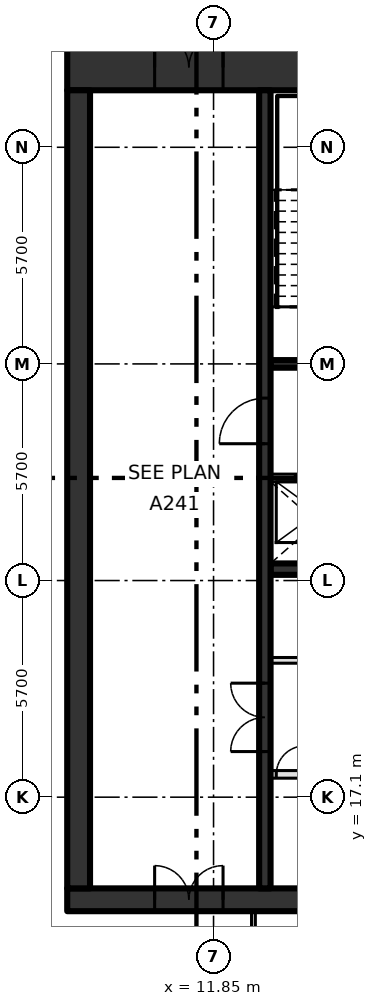
"""IFC4 building model, lengths in metres.
Left out: names, types, materials, properties, quantities, classifications, styles, units other than length and angle.
Written with IfcOpenShell. Run it as: python <this file> out.ifc"""

import sys

from ifc_helpers import new_model, si_unit, direction, frame, frame_2d, origin, place, context, subcontext, project, spatial, rectangle, extrude, element, fill, save


model = new_model("IFC4")
c1 = context("Model", 3, precision=1e-05, world=origin(), true_north=direction((0.0, 1.0)))
c2 = subcontext(c1, "Body", "Model", "MODEL_VIEW")
j1 = project(units=[si_unit("LENGTHUNIT", "METRE"), si_unit("PLANEANGLEUNIT", "RADIAN")], contexts=[c1])
p1 = place(None, origin())
s1 = spatial("IfcSite", under=j1, at=p1, CompositionType="ELEMENT")
p2 = place(p1, origin())
s2 = spatial("IfcBuilding", under=s1, at=p2, CompositionType="ELEMENT")
p3 = place(p2, frame((0.0, 0.0, 310.8)))
s3 = spatial("IfcBuildingStorey", under=s2, at=p3, CompositionType="ELEMENT", Elevation=310.8)
p4 = place(p3, frame((8.0, 14.4, -0.3), z_axis=(0.0, 0.0, 1.0), x_axis=(1.0, 0.0, 0.0)))
e1 = element("IfcWall", 1, at=p4, inside=s3, PredefinedType="SHEAR", context=c2, shape_type="SweptSolid", body=[
    extrude(rectangle(XDim=22.8, YDim=0.6, at=frame_2d((11.4, 0.0))), origin(), (0.0, 0.0, 1.0), 4.2),
])
p5 = place(p4, frame((2.3, 0.0, 0.3)))
e2 = element("IfcOpeningElement", 2, at=p5, cuts=e1, PredefinedType="OPENING", context=c2, shape_type="SweptSolid", body=[
    extrude(rectangle(XDim=1.8, YDim=2.1, at=frame_2d((0.9, 1.05))), frame((0.0, 0.31, 0.0), z_axis=(0.0, -1.0, 0.0), x_axis=(1.0, 0.0, 0.0)), (0.0, 0.0, 1.0), 0.62),
])
p6 = place(p3, frame((8.0, 36.3, -0.3), z_axis=(0.0, 0.0, 1.0), x_axis=(1.0, 0.0, 0.0)))
e3 = element("IfcWall", 3, at=p6, inside=s3, PredefinedType="SHEAR", context=c2, shape_type="SweptSolid", body=[
    extrude(rectangle(XDim=22.8, YDim=1.2, at=frame_2d((11.4, 0.0))), origin(), (0.0, 0.0, 1.0), 4.2),
])
p7 = place(p6, frame((2.3, 0.0, 0.3)))
e4 = element("IfcOpeningElement", 4, at=p7, cuts=e3, PredefinedType="OPENING", context=c2, shape_type="SweptSolid", body=[
    extrude(rectangle(XDim=1.8, YDim=2.1, at=frame_2d((0.9, 1.05))), frame((0.0, 0.61, 0.0), z_axis=(0.0, -1.0, 0.0), x_axis=(1.0, 0.0, 0.0)), (0.0, 0.0, 1.0), 1.22),
])
p8 = place(p3, frame((8.3, 14.7, -0.3), z_axis=(0.0, 0.0, 1.0), x_axis=(0.0, 1.0, 0.0)))
e5 = element("IfcWall", 5, at=p8, inside=s3, PredefinedType="SHEAR", context=c2, shape_type="SweptSolid", body=[
    extrude(rectangle(XDim=21.0, YDim=0.6, at=frame_2d((10.5, 0.0))), origin(), (0.0, 0.0, 1.0), 4.2),
])
p9 = place(p3, frame((13.35, 17.7, 0.0), z_axis=(0.0, 0.0, 1.0), x_axis=(1.0, 0.0, 0.0)))
e6 = element("IfcWall", 6, at=p9, inside=s3, PredefinedType="SOLIDWALL", context=c2, shape_type="SweptSolid", body=[
    extrude(rectangle(XDim=13.425, YDim=0.2, at=frame_2d((6.712, 0.0))), origin(), (0.0, 0.0, 1.0), 3.9),
])
p10 = place(p9, frame((2.0, 0.0, 0.0)))
e7 = element("IfcOpeningElement", 7, at=p10, cuts=e6, PredefinedType="OPENING", context=c2, shape_type="SweptSolid", body=[
    extrude(rectangle(XDim=1.1, YDim=2.1, at=frame_2d((0.55, 1.05))), frame((0.0, 0.11, 0.0), z_axis=(0.0, -1.0, 0.0), x_axis=(1.0, 0.0, 0.0)), (0.0, 0.0, 1.0), 0.22),
])
p11 = place(p9, frame((4.7, 0.0, 0.0)))
e8 = element("IfcOpeningElement", 8, at=p11, cuts=e6, PredefinedType="OPENING", context=c2, shape_type="SweptSolid", body=[
    extrude(rectangle(XDim=1.1, YDim=2.1, at=frame_2d((0.55, 1.05))), frame((0.0, 0.11, 0.0), z_axis=(0.0, -1.0, 0.0), x_axis=(1.0, 0.0, 0.0)), (0.0, 0.0, 1.0), 0.22),
])
p12 = place(p9, frame((7.4, 0.0, 0.0)))
e9 = element("IfcOpeningElement", 9, at=p12, cuts=e6, PredefinedType="OPENING", context=c2, shape_type="SweptSolid", body=[
    extrude(rectangle(XDim=1.1, YDim=2.1, at=frame_2d((0.55, 1.05))), frame((0.0, 0.11, 0.0), z_axis=(0.0, -1.0, 0.0), x_axis=(1.0, 0.0, 0.0)), (0.0, 0.0, 1.0), 0.22),
])
p13 = place(p9, frame((10.1, 0.0, 0.0)))
e10 = element("IfcOpeningElement", 10, at=p13, cuts=e6, PredefinedType="OPENING", context=c2, shape_type="SweptSolid", body=[
    extrude(rectangle(XDim=1.1, YDim=2.1, at=frame_2d((0.55, 1.05))), frame((0.0, 0.11, 0.0), z_axis=(0.0, -1.0, 0.0), x_axis=(1.0, 0.0, 0.0)), (0.0, 0.0, 1.0), 0.22),
])
p14 = place(p9, frame((0.15, 0.0, 0.0)))
e11 = element("IfcOpeningElement", 11, at=p14, cuts=e6, PredefinedType="OPENING", context=c2, shape_type="SweptSolid", body=[
    extrude(rectangle(XDim=0.75, YDim=2.1, at=frame_2d((0.375, 1.05))), frame((0.0, 0.11, 0.0), z_axis=(0.0, -1.0, 0.0), x_axis=(1.0, 0.0, 0.0)), (0.0, 0.0, 1.0), 0.22),
])
p15 = place(p9, frame((12.3, 0.0, 0.0)))
e12 = element("IfcOpeningElement", 12, at=p15, cuts=e6, PredefinedType="OPENING", context=c2, shape_type="SweptSolid", body=[
    extrude(rectangle(XDim=0.75, YDim=2.1, at=frame_2d((0.375, 1.05))), frame((0.0, 0.11, 0.0), z_axis=(0.0, -1.0, 0.0), x_axis=(1.0, 0.0, 0.0)), (0.0, 0.0, 1.0), 0.22),
])
p16 = place(p3, frame((13.35, 20.7, 0.0), z_axis=(0.0, 0.0, 1.0), x_axis=(1.0, 0.0, 0.0)))
e13 = element("IfcWall", 13, at=p16, inside=s3, PredefinedType="PARTITIONING", context=c2, shape_type="SweptSolid", body=[
    extrude(rectangle(XDim=13.425, YDim=0.15, at=frame_2d((6.712, 0.0))), origin(), (0.0, 0.0, 1.0), 3.9),
])
p17 = place(p16, frame((0.75, 0.0, 0.0)))
e14 = element("IfcOpeningElement", 14, at=p17, cuts=e13, PredefinedType="OPENING", context=c2, shape_type="SweptSolid", body=[
    extrude(rectangle(XDim=0.9, YDim=2.1, at=frame_2d((0.45, 1.05))), frame((0.0, 0.085, 0.0), z_axis=(0.0, -1.0, 0.0), x_axis=(1.0, 0.0, 0.0)), (0.0, 0.0, 1.0), 0.17),
])
p18 = place(p16, frame((7.5, 0.0, 0.0)))
e15 = element("IfcOpeningElement", 15, at=p18, cuts=e13, PredefinedType="OPENING", context=c2, shape_type="SweptSolid", body=[
    extrude(rectangle(XDim=0.9, YDim=2.1, at=frame_2d((0.45, 1.05))), frame((0.0, 0.085, 0.0), z_axis=(0.0, -1.0, 0.0), x_axis=(1.0, 0.0, 0.0)), (0.0, 0.0, 1.0), 0.17),
])
p19 = place(p3, frame((13.35, 23.1, 0.0), z_axis=(0.0, 0.0, 1.0), x_axis=(1.0, 0.0, 0.0)))
e16 = element("IfcWall", 16, at=p19, inside=s3, PredefinedType="SHEAR", context=c2, shape_type="SweptSolid", body=[
    extrude(rectangle(XDim=16.85, YDim=0.3, at=frame_2d((8.425, 0.0))), origin(), (0.0, 0.0, 1.0), 3.9),
])
p20 = place(p3, frame((13.35, 25.5, 0.0), z_axis=(0.0, 0.0, 1.0), x_axis=(1.0, 0.0, 0.0)))
e17 = element("IfcWall", 17, at=p20, inside=s3, PredefinedType="SOLIDWALL", context=c2, shape_type="SweptSolid", body=[
    extrude(rectangle(XDim=16.85, YDim=0.2, at=frame_2d((8.425, 0.0))), origin(), (0.0, 0.0, 1.0), 3.9),
])
p21 = place(p20, frame((0.65, 0.0, 0.0)))
e18 = element("IfcOpeningElement", 18, at=p21, cuts=e17, PredefinedType="OPENING", context=c2, shape_type="SweptSolid", body=[
    extrude(rectangle(XDim=1.1, YDim=2.1, at=frame_2d((0.55, 1.05))), frame((0.0, 0.11, 0.0), z_axis=(0.0, -1.0, 0.0), x_axis=(1.0, 0.0, 0.0)), (0.0, 0.0, 1.0), 0.22),
])
p22 = place(p20, frame((3.35, 0.0, 0.0)))
e19 = element("IfcOpeningElement", 19, at=p22, cuts=e17, PredefinedType="OPENING", context=c2, shape_type="SweptSolid", body=[
    extrude(rectangle(XDim=1.1, YDim=2.1, at=frame_2d((0.55, 1.05))), frame((0.0, 0.11, 0.0), z_axis=(0.0, -1.0, 0.0), x_axis=(1.0, 0.0, 0.0)), (0.0, 0.0, 1.0), 0.22),
])
p23 = place(p20, frame((6.05, 0.0, 0.0)))
e20 = element("IfcOpeningElement", 20, at=p23, cuts=e17, PredefinedType="OPENING", context=c2, shape_type="SweptSolid", body=[
    extrude(rectangle(XDim=1.1, YDim=2.1, at=frame_2d((0.55, 1.05))), frame((0.0, 0.11, 0.0), z_axis=(0.0, -1.0, 0.0), x_axis=(1.0, 0.0, 0.0)), (0.0, 0.0, 1.0), 0.22),
])
p24 = place(p20, frame((8.75, 0.0, 0.0)))
e21 = element("IfcOpeningElement", 21, at=p24, cuts=e17, PredefinedType="OPENING", context=c2, shape_type="SweptSolid", body=[
    extrude(rectangle(XDim=1.1, YDim=2.1, at=frame_2d((0.55, 1.05))), frame((0.0, 0.11, 0.0), z_axis=(0.0, -1.0, 0.0), x_axis=(1.0, 0.0, 0.0)), (0.0, 0.0, 1.0), 0.22),
])
p25 = place(p20, frame((13.0, 0.0, 0.0)))
e22 = element("IfcOpeningElement", 22, at=p25, cuts=e17, PredefinedType="OPENING", context=c2, shape_type="SweptSolid", body=[
    extrude(rectangle(XDim=0.9, YDim=2.1, at=frame_2d((0.45, 1.05))), frame((0.0, 0.11, 0.0), z_axis=(0.0, -1.0, 0.0), x_axis=(1.0, 0.0, 0.0)), (0.0, 0.0, 1.0), 0.22),
])
p26 = place(p3, frame((13.35, 28.5, 0.0), z_axis=(0.0, 0.0, 1.0), x_axis=(1.0, 0.0, 0.0)))
e23 = element("IfcWall", 23, at=p26, inside=s3, PredefinedType="SOLIDWALL", context=c2, shape_type="SweptSolid", body=[
    extrude(rectangle(XDim=6.75, YDim=0.2, at=frame_2d((3.375, 0.0))), origin(), (0.0, 0.0, 1.0), 3.9),
])
p27 = place(p26, frame((0.95, 0.0, 0.0)))
e24 = element("IfcOpeningElement", 24, at=p27, cuts=e23, PredefinedType="OPENING", context=c2, shape_type="SweptSolid", body=[
    extrude(rectangle(XDim=1.2, YDim=2.1, at=frame_2d((0.6, 1.05))), frame((0.0, 0.11, 0.0), z_axis=(0.0, -1.0, 0.0), x_axis=(1.0, 0.0, 0.0)), (0.0, 0.0, 1.0), 0.22),
])
p28 = place(p26, frame((3.75, 0.0, 0.0)))
e25 = element("IfcOpeningElement", 25, at=p28, cuts=e23, PredefinedType="OPENING", context=c2, shape_type="SweptSolid", body=[
    extrude(rectangle(XDim=1.1, YDim=2.1, at=frame_2d((0.55, 1.05))), frame((0.0, 0.11, 0.0), z_axis=(0.0, -1.0, 0.0), x_axis=(1.0, 0.0, 0.0)), (0.0, 0.0, 1.0), 0.22),
])
p29 = place(p3, frame((13.2, 14.7, 0.0), z_axis=(0.0, 0.0, 1.0), x_axis=(0.0, 1.0, 0.0)))
e26 = element("IfcWall", 26, at=p29, inside=s3, PredefinedType="SHEAR", context=c2, shape_type="SweptSolid", body=[
    extrude(rectangle(XDim=21.0, YDim=0.3, at=frame_2d((10.5, 0.0))), origin(), (0.0, 0.0, 1.0), 3.9),
])
p30 = place(p29, frame((3.6, 0.0, 0.0)))
e27 = element("IfcOpeningElement", 27, at=p30, cuts=e26, PredefinedType="OPENING", context=c2, shape_type="SweptSolid", body=[
    extrude(rectangle(XDim=1.8, YDim=2.1, at=frame_2d((0.9, 1.05))), frame((0.0, 0.16, 0.0), z_axis=(0.0, -1.0, 0.0), x_axis=(1.0, 0.0, 0.0)), (0.0, 0.0, 1.0), 0.32),
])
p31 = place(p29, frame((11.7, 0.0, 0.0)))
e28 = element("IfcOpeningElement", 28, at=p31, cuts=e26, PredefinedType="OPENING", context=c2, shape_type="SweptSolid", body=[
    extrude(rectangle(XDim=1.2, YDim=2.1, at=frame_2d((0.6, 1.05))), frame((0.0, 0.16, 0.0), z_axis=(0.0, -1.0, 0.0), x_axis=(1.0, 0.0, 0.0)), (0.0, 0.0, 1.0), 0.32),
])
p32 = place(p3, frame((12.9, 10.078, 0.0), z_axis=(0.0, 0.0, 1.0), x_axis=(0.0, 1.0, 0.0)))
e29 = element("IfcWall", 29, at=p32, inside=s3, PredefinedType="PARTITIONING", context=c2, shape_type="SweptSolid", body=[
    extrude(rectangle(XDim=4.022, YDim=0.1, at=frame_2d((2.011, 0.0))), origin(), (0.0, 0.0, 1.0), 3.9),
])
p33 = place(p21, origin())
e30 = element("IfcDoor", 30, at=p33, inside=s3, OperationType="SLIDING_TO_LEFT", PredefinedType="DOOR", context=c2, shape_type="SweptSolid", body=[
    extrude(rectangle(XDim=1.1, YDim=2.1, at=frame_2d((0.55, 1.05))), frame((0.0, 0.025, 0.0), z_axis=(0.0, -1.0, 0.0), x_axis=(1.0, 0.0, 0.0)), (0.0, 0.0, 1.0), 0.05),
])
fill(e18, e30)
p34 = place(p14, origin())
e31 = element("IfcDoor", 31, at=p34, inside=s3, OperationType="SINGLE_SWING_RIGHT", PredefinedType="DOOR", context=c2, shape_type="SweptSolid", body=[
    extrude(rectangle(XDim=0.75, YDim=2.1, at=frame_2d((0.375, 1.05))), frame((0.0, 0.025, 0.0), z_axis=(0.0, -1.0, 0.0), x_axis=(1.0, 0.0, 0.0)), (0.0, 0.0, 1.0), 0.05),
])
fill(e11, e31)
p35 = place(p30, origin())
e32 = element("IfcDoor", 32, at=p35, inside=s3, OperationType="DOUBLE_DOOR_SINGLE_SWING", PredefinedType="DOOR", context=c2, shape_type="SweptSolid", body=[
    extrude(rectangle(XDim=1.8, YDim=2.1, at=frame_2d((0.9, 1.05))), frame((0.0, 0.025, 0.0), z_axis=(0.0, -1.0, 0.0), x_axis=(1.0, 0.0, 0.0)), (0.0, 0.0, 1.0), 0.05),
])
fill(e27, e32)
p36 = place(p31, origin())
e33 = element("IfcDoor", 33, at=p36, inside=s3, OperationType="SINGLE_SWING_LEFT", PredefinedType="DOOR", context=c2, shape_type="SweptSolid", body=[
    extrude(rectangle(XDim=1.2, YDim=2.1, at=frame_2d((0.6, 1.05))), frame((0.0, 0.025, 0.0), z_axis=(0.0, -1.0, 0.0), x_axis=(1.0, 0.0, 0.0)), (0.0, 0.0, 1.0), 0.05),
])
fill(e28, e33)
p37 = place(p7, origin())
e34 = element("IfcDoor", 34, at=p37, inside=s3, OperationType="DOUBLE_DOOR_SINGLE_SWING", PredefinedType="DOOR", context=c2, shape_type="SweptSolid", body=[
    extrude(rectangle(XDim=1.8, YDim=2.1, at=frame_2d((0.9, 1.05))), frame((0.0, 0.025, 0.0), z_axis=(0.0, -1.0, 0.0), x_axis=(1.0, 0.0, 0.0)), (0.0, 0.0, 1.0), 0.05),
])
fill(e4, e34)
p38 = place(p5, origin())
e35 = element("IfcDoor", 35, at=p38, inside=s3, OperationType="DOUBLE_DOOR_SINGLE_SWING", PredefinedType="DOOR", context=c2, shape_type="SweptSolid", body=[
    extrude(rectangle(XDim=1.8, YDim=2.1, at=frame_2d((0.9, 1.05))), frame((0.0, 0.025, 0.0), z_axis=(0.0, -1.0, 0.0), x_axis=(1.0, 0.0, 0.0)), (0.0, 0.0, 1.0), 0.05),
])
fill(e2, e35)
save(model, sys.argv[1])
